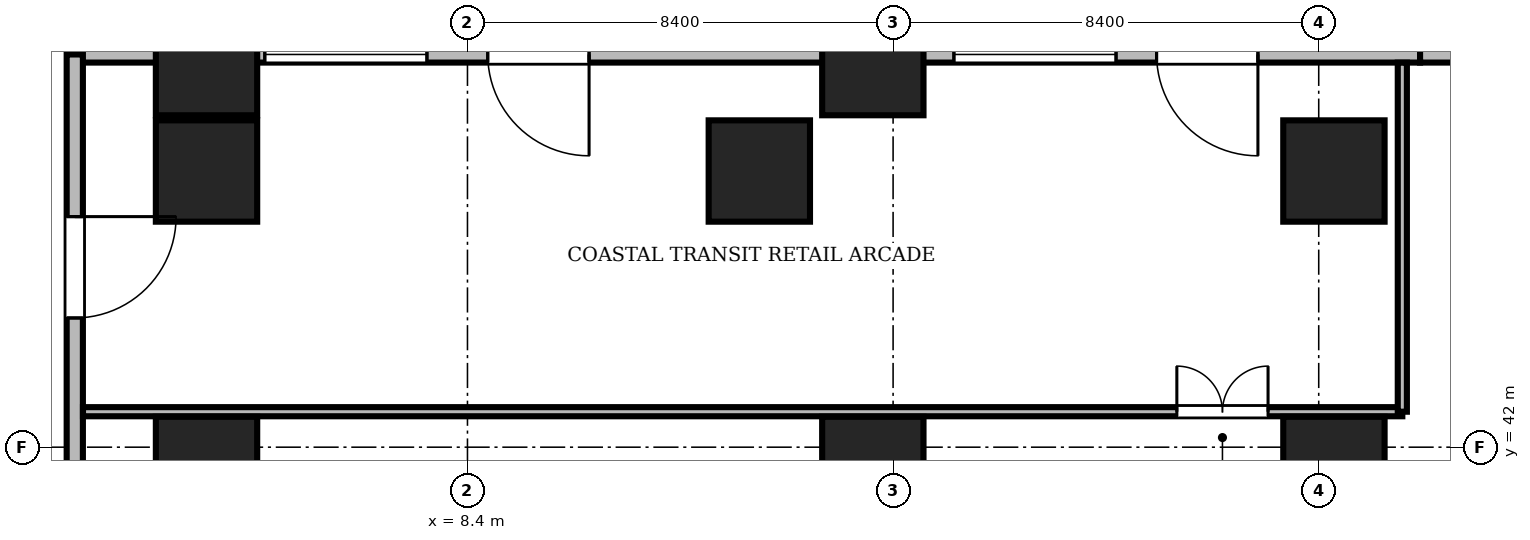
"""IFC4 building model, lengths in metres.
Left out: names, types, materials, properties, quantities, classifications, styles, units other than length and angle.
Written with IfcOpenShell. Run it as: python <this file> out.ifc"""

import sys

from ifc_helpers import new_model, si_unit, direction, frame, frame_2d, origin, origin_2d, place, context, subcontext, project, spatial, rectangle, extrude, source, transform, mapped, element, fill, save


model = new_model("IFC4")
c1 = context("Model", 3, precision=1e-05, world=origin(), true_north=direction((0.0, 1.0)))
c2 = subcontext(c1, "Body", "Model", "MODEL_VIEW")
j1 = project(units=[si_unit("LENGTHUNIT", "METRE"), si_unit("PLANEANGLEUNIT", "RADIAN")], contexts=[c1])
p1 = place(None, origin())
s1 = spatial("IfcSite", under=j1, at=p1, CompositionType="ELEMENT")
p2 = place(p1, origin())
s2 = spatial("IfcBuilding", under=s1, at=p2, CompositionType="ELEMENT")
p3 = place(p2, origin())
s3 = spatial("IfcBuildingStorey", under=s2, at=p3, CompositionType="ELEMENT", Elevation=0.0)
m1 = source(origin(), c2, "Body", "SweptSolid", [
    extrude(rectangle(XDim=2.0, YDim=2.0, at=origin_2d()), origin(), (0.0, 0.0, 1.0), 5.68),
])
for number, where, z_axis, x_axis in (
    (1, (3.25, 41.6, 0.0), (0.0, 0.0, 1.0), (1.0, 0.0, 0.0)),
    (2, (3.25, 49.55, 0.0), (0.0, 0.0, 1.0), (1.0, 0.0, 0.0)),
    (3, (16.4, 41.6, 0.0), (0.0, 0.0, 1.0), (1.0, 0.0, 0.0)),
    (4, (25.5, 41.6, 0.0), (0.0, 0.0, 1.0), (1.0, 0.0, 0.0)),
    (5, (3.25, 47.45, 0.0), (0.0, 0.0, 1.0), (1.0, 0.0, 0.0)),
    (6, (14.16, 47.45, 0.0), (0.0, 0.0, 1.0), (1.0, 0.0, 0.0)),
    (7, (25.5, 47.45, 0.0), (0.0, 0.0, 1.0), (1.0, 0.0, 0.0)),
    (8, (16.4, 49.55, 0.0), (0.0, 0.0, 1.0), (1.0, 0.0, 0.0)),
):
    element("IfcColumn", number, at=place(p3, frame(where, z_axis=z_axis, x_axis=x_axis)), inside=s3, PredefinedType="COLUMN", context=c2, shape_type="MappedRepresentation", body=[
        mapped(m1, transform((0.0, 0.0, 0.0), scale=1.0)),
    ])
m2 = source(origin(), c2, "Body", "SweptSolid", [
    extrude(rectangle(XDim=15.35, YDim=0.32, at=frame_2d((7.675, 0.0))), origin(), (0.0, 0.0, 1.0), 5.151),
])
p4 = place(p3, frame((16.0, 49.75, 0.0), z_axis=(0.0, 0.0, 1.0), x_axis=(-1.0, 0.0, 0.0)))
e9 = element("IfcWall", 9, at=p4, inside=s3, PredefinedType="SOLIDWALL", context=c2, shape_type="MappedRepresentation", body=[
    mapped(m2, transform((0.0, 0.0, 0.0), scale=1.0)),
])
m3 = source(origin(), c2, "Body", "SweptSolid", [
    extrude(rectangle(XDim=2.0, YDim=2.6, at=frame_2d((1.0, 1.3))), frame((0.0, 0.17, 0.0), z_axis=(0.0, -1.0, 0.0), x_axis=(1.0, 0.0, 0.0)), (0.0, 0.0, 1.0), 0.34),
])
p5 = place(p4, frame((5.2, 0.0, 0.0)))
e10 = element("IfcOpeningElement", 10, at=p5, cuts=e9, PredefinedType="OPENING", context=c2, shape_type="MappedRepresentation", body=[
    mapped(m3, transform((0.0, 0.0, 0.0), scale=1.0)),
])
m4 = source(origin(), c2, "Body", "SweptSolid", [
    extrude(rectangle(XDim=3.2, YDim=3.4, at=frame_2d((1.6, 1.7))), frame((0.0, 0.17, 0.0), z_axis=(0.0, -1.0, 0.0), x_axis=(1.0, 0.0, 0.0)), (0.0, 0.0, 1.0), 0.34),
])
p6 = place(p4, frame((8.4, 0.0, 0.85)))
e11 = element("IfcOpeningElement", 11, at=p6, cuts=e9, PredefinedType="OPENING", context=c2, shape_type="MappedRepresentation", body=[
    mapped(m4, transform((0.0, 0.0, 0.0), scale=1.0)),
])
m5 = source(origin(), c2, "Body", "SweptSolid", [
    extrude(rectangle(XDim=11.2, YDim=0.32, at=frame_2d((5.6, 0.0))), origin(), (0.0, 0.0, 1.0), 5.151),
])
p7 = place(p3, frame((27.2, 49.75, 0.0), z_axis=(0.0, 0.0, 1.0), x_axis=(-1.0, 0.0, 0.0)))
e12 = element("IfcWall", 12, at=p7, inside=s3, PredefinedType="SOLIDWALL", context=c2, shape_type="MappedRepresentation", body=[
    mapped(m5, transform((0.0, 0.0, 0.0), scale=1.0)),
])
p8 = place(p7, frame((3.2, 0.0, 0.0)))
e13 = element("IfcOpeningElement", 13, at=p8, cuts=e12, PredefinedType="OPENING", context=c2, shape_type="MappedRepresentation", body=[
    mapped(m3, transform((0.0, 0.0, 0.0), scale=1.0)),
])
p9 = place(p7, frame((6.0, 0.0, 0.85)))
e14 = element("IfcOpeningElement", 14, at=p9, cuts=e12, PredefinedType="OPENING", context=c2, shape_type="MappedRepresentation", body=[
    mapped(m4, transform((0.0, 0.0, 0.0), scale=1.0)),
])
m6 = source(origin(), c2, "Body", "SweptSolid", [
    extrude(rectangle(XDim=40.0, YDim=0.32, at=frame_2d((20.0, 0.0))), origin(), (0.0, 0.0, 1.0), 5.151),
])
p10 = place(p3, frame((67.2, 49.75, 0.0), z_axis=(0.0, 0.0, 1.0), x_axis=(-1.0, 0.0, 0.0)))
e15 = element("IfcWall", 15, at=p10, inside=s3, PredefinedType="SOLIDWALL", context=c2, shape_type="MappedRepresentation", body=[
    mapped(m6, transform((0.0, 0.0, 0.0), scale=1.0)),
])
p11 = place(p10, frame((13.5, 0.0, 0.0)))
e16 = element("IfcOpeningElement", 16, at=p11, cuts=e15, PredefinedType="OPENING", context=c2, shape_type="MappedRepresentation", body=[
    mapped(m3, transform((0.0, 0.0, 0.0), scale=1.0)),
])
p12 = place(p10, frame((2.6, 0.0, 0.85)))
e17 = element("IfcOpeningElement", 17, at=p12, cuts=e15, PredefinedType="OPENING", context=c2, shape_type="MappedRepresentation", body=[
    mapped(m4, transform((0.0, 0.0, 0.0), scale=1.0)),
])
m7 = source(origin(), c2, "Body", "SweptSolid", [
    extrude(rectangle(XDim=22.15, YDim=0.32, at=frame_2d((11.075, 0.0))), origin(), (0.0, 0.0, 1.0), 5.68),
])
p13 = place(p3, frame((0.65, 49.75, 0.0), z_axis=(0.0, 0.0, 1.0), x_axis=(0.0, -1.0, 0.0)))
e18 = element("IfcWall", 18, at=p13, inside=s3, PredefinedType="SOLIDWALL", context=c2, shape_type="MappedRepresentation", body=[
    mapped(m7, transform((0.0, 0.0, 0.0), scale=1.0)),
])
p14 = place(p13, frame((3.2, 0.0, 0.0)))
e19 = element("IfcOpeningElement", 19, at=p14, cuts=e18, PredefinedType="OPENING", context=c2, shape_type="MappedRepresentation", body=[
    mapped(m3, transform((0.0, 0.0, 0.0), scale=1.0)),
])
p15 = place(p13, frame((9.7, 0.0, 0.0)))
e20 = element("IfcOpeningElement", 20, at=p15, cuts=e18, PredefinedType="OPENING", context=c2, shape_type="MappedRepresentation", body=[
    mapped(m3, transform((0.0, 0.0, 0.0), scale=1.0)),
])
p16 = place(p13, frame((14.8, 0.0, 0.85)))
e21 = element("IfcOpeningElement", 21, at=p16, cuts=e18, PredefinedType="OPENING", context=c2, shape_type="MappedRepresentation", body=[
    mapped(m4, transform((0.0, 0.0, 0.0), scale=1.0)),
])
m8 = source(origin(), c2, "Body", "SweptSolid", [
    extrude(rectangle(XDim=26.038, YDim=0.18, at=frame_2d((13.019, 0.0))), origin(), (0.0, 0.0, 1.0), 5.072),
])
p17 = place(p3, frame((0.812, 42.7, 0.0), z_axis=(0.0, 0.0, 1.0), x_axis=(1.0, 0.0, 0.0)))
e22 = element("IfcWall", 22, at=p17, inside=s3, PredefinedType="PARTITIONING", context=c2, shape_type="MappedRepresentation", body=[
    mapped(m8, transform((0.0, 0.0, 0.0), scale=1.0)),
])
m9 = source(origin(), c2, "Body", "SweptSolid", [
    extrude(rectangle(XDim=1.8, YDim=2.4, at=frame_2d((0.9, 1.2))), frame((0.0, 0.1, 0.0), z_axis=(0.0, -1.0, 0.0), x_axis=(1.0, 0.0, 0.0)), (0.0, 0.0, 1.0), 0.2),
])
p18 = place(p17, frame((21.588, 0.0, 0.0)))
e23 = element("IfcOpeningElement", 23, at=p18, cuts=e22, PredefinedType="OPENING", context=c2, shape_type="MappedRepresentation", body=[
    mapped(m9, transform((0.0, 0.0, 0.0), scale=1.0)),
])
m10 = source(origin(), c2, "Body", "SweptSolid", [
    extrude(rectangle(XDim=6.888, YDim=0.18, at=frame_2d((3.444, 0.0))), origin(), (0.0, 0.0, 1.0), 5.148),
])
p19 = place(p3, frame((26.85, 42.7, 0.0), z_axis=(0.0, 0.0, 1.0), x_axis=(0.0, 1.0, 0.0)))
e24 = element("IfcWall", 24, at=p19, inside=s3, PredefinedType="PARTITIONING", context=c2, shape_type="MappedRepresentation", body=[
    mapped(m10, transform((0.0, 0.0, 0.0), scale=1.0)),
])
m11 = source(origin(), c2, "Body", "SweptSolid", [
    extrude(rectangle(XDim=2.0, YDim=2.6, at=frame_2d((1.0, 1.3))), frame((0.0, 0.025, 0.0), z_axis=(0.0, -1.0, 0.0), x_axis=(1.0, 0.0, 0.0)), (0.0, 0.0, 1.0), 0.05),
])
p20 = place(p5, frame((2.0, 0.0, 0.0), z_axis=(0.0, 0.0, 1.0), x_axis=(-1.0, 0.0, 0.0)))
e25 = element("IfcDoor", 25, at=p20, inside=s3, OperationType="DOUBLE_DOOR_SINGLE_SWING", PredefinedType="DOOR", context=c2, shape_type="MappedRepresentation", body=[
    mapped(m11, transform((0.0, 0.0, 0.0), scale=1.0)),
])
fill(e10, e25)
m12 = source(origin(), c2, "Body", "SweptSolid", [
    extrude(rectangle(XDim=3.2, YDim=3.4, at=frame_2d((1.6, 1.7))), frame((0.0, 0.03, 0.0), z_axis=(0.0, -1.0, 0.0), x_axis=(1.0, 0.0, 0.0)), (0.0, 0.0, 1.0), 0.06),
])
p21 = place(p6, origin())
e26 = element("IfcWindow", 26, at=p21, inside=s3, PartitioningType="SINGLE_PANEL", PredefinedType="WINDOW", context=c2, shape_type="MappedRepresentation", body=[
    mapped(m12, transform((0.0, 0.0, 0.0), scale=1.0)),
])
fill(e11, e26)
p22 = place(p8, frame((2.0, 0.0, 0.0), z_axis=(0.0, 0.0, 1.0), x_axis=(-1.0, 0.0, 0.0)))
e27 = element("IfcDoor", 27, at=p22, inside=s3, OperationType="DOUBLE_DOOR_SINGLE_SWING", PredefinedType="DOOR", context=c2, shape_type="MappedRepresentation", body=[
    mapped(m11, transform((0.0, 0.0, 0.0), scale=1.0)),
])
fill(e13, e27)
p23 = place(p9, origin())
e28 = element("IfcWindow", 28, at=p23, inside=s3, PartitioningType="SINGLE_PANEL", PredefinedType="WINDOW", context=c2, shape_type="MappedRepresentation", body=[
    mapped(m12, transform((0.0, 0.0, 0.0), scale=1.0)),
])
fill(e14, e28)
p24 = place(p14, frame((2.0, 0.0, 0.0), z_axis=(0.0, 0.0, 1.0), x_axis=(-1.0, 0.0, 0.0)))
e29 = element("IfcDoor", 29, at=p24, inside=s3, OperationType="DOUBLE_DOOR_SINGLE_SWING", PredefinedType="DOOR", context=c2, shape_type="MappedRepresentation", body=[
    mapped(m11, transform((0.0, 0.0, 0.0), scale=1.0)),
])
fill(e19, e29)
m13 = source(origin(), c2, "Body", "SweptSolid", [
    extrude(rectangle(XDim=1.8, YDim=2.4, at=frame_2d((0.9, 1.2))), frame((0.0, 0.025, 0.0), z_axis=(0.0, -1.0, 0.0), x_axis=(1.0, 0.0, 0.0)), (0.0, 0.0, 1.0), 0.05),
])
p25 = place(p18, origin())
e30 = element("IfcDoor", 30, at=p25, inside=s3, OperationType="DOUBLE_DOOR_SINGLE_SWING", PredefinedType="DOOR", context=c2, shape_type="MappedRepresentation", body=[
    mapped(m13, transform((0.0, 0.0, 0.0), scale=1.0)),
])
fill(e23, e30)
save(model, sys.argv[1])
